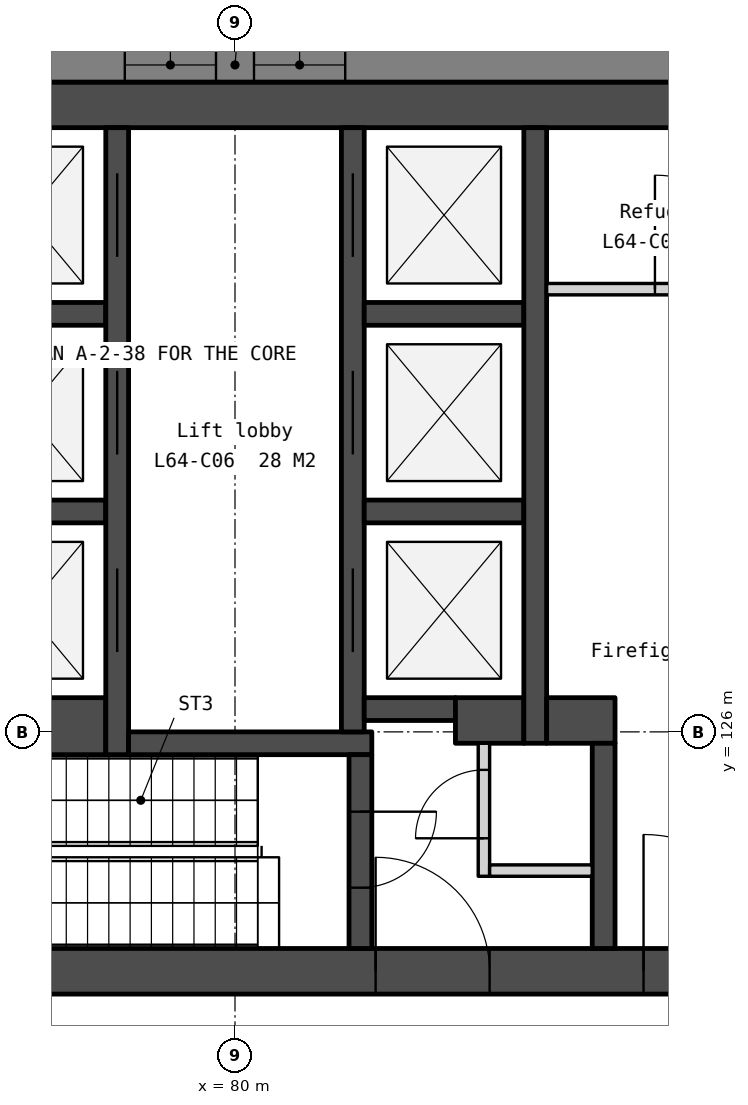
"""IFC4 building model, lengths in metres.
Left out: names, types, materials, properties, quantities, classifications, styles, units other than length and angle.
Written with IfcOpenShell. Run it as: python <this file> out.ifc"""

import sys

from ifc_helpers import new_model, si_unit, direction, frame, frame_2d, origin, place, context, subcontext, project, spatial, polyline, rectangle, outline, extrude, element, fill, save


model = new_model("IFC4")
c1 = context("Model", 3, precision=1e-05, world=origin(), true_north=direction((0.0, 1.0)))
c2 = subcontext(c1, "Body", "Model", "MODEL_VIEW")
j1 = project(units=[si_unit("LENGTHUNIT", "METRE"), si_unit("PLANEANGLEUNIT", "RADIAN")], contexts=[c1])
p1 = place(None, origin())
s1 = spatial("IfcSite", under=j1, at=p1, CompositionType="ELEMENT")
p2 = place(p1, origin())
s2 = spatial("IfcBuilding", under=s1, at=p2, CompositionType="ELEMENT")
p3 = place(p2, frame((0.0, 0.0, 262.1)))
s3 = spatial("IfcBuildingStorey", under=s2, at=p3, CompositionType="ELEMENT", Elevation=262.1)
p4 = place(p3, frame((69.0, 134.25, 0.0), z_axis=(0.0, 0.0, 1.0), x_axis=(1.0, 0.0, 0.0)))
e1 = element("IfcWall", 1, at=p4, inside=s3, PredefinedType="SOLIDWALL", context=c2, shape_type="SweptSolid", body=[
    extrude(rectangle(XDim=22.0, YDim=0.6, at=frame_2d((11.0, 0.0))), origin(), (0.0, 0.0, 1.0), 3.75),
])
p5 = place(p3, frame((69.0, 122.85, 0.0), z_axis=(0.0, 0.0, 1.0), x_axis=(1.0, 0.0, 0.0)))
e2 = element("IfcWall", 2, at=p5, inside=s3, PredefinedType="SOLIDWALL", context=c2, shape_type="SweptSolid", body=[
    extrude(rectangle(XDim=22.0, YDim=0.6, at=frame_2d((11.0, 0.0))), origin(), (0.0, 0.0, 1.0), 3.75),
])
p6 = place(p5, frame((16.375, 0.0, 0.0)))
e3 = element("IfcOpeningElement", 3, at=p6, cuts=e2, PredefinedType="OPENING", context=c2, shape_type="SweptSolid", body=[
    extrude(rectangle(XDim=1.8, YDim=2.1, at=frame_2d((0.9, 1.05))), frame((0.0, 0.31, 0.0), z_axis=(0.0, -1.0, 0.0), x_axis=(1.0, 0.0, 0.0)), (0.0, 0.0, 1.0), 0.62),
])
p7 = place(p5, frame((3.825, 0.0, 0.0)))
e4 = element("IfcOpeningElement", 4, at=p7, cuts=e2, PredefinedType="OPENING", context=c2, shape_type="SweptSolid", body=[
    extrude(rectangle(XDim=1.8, YDim=2.1, at=frame_2d((0.9, 1.05))), frame((0.0, 0.31, 0.0), z_axis=(0.0, -1.0, 0.0), x_axis=(1.0, 0.0, 0.0)), (0.0, 0.0, 1.0), 0.62),
])
p8 = place(p5, frame((12.85, 0.0, 0.0)))
e5 = element("IfcOpeningElement", 5, at=p8, cuts=e2, PredefinedType="OPENING", context=c2, shape_type="SweptSolid", body=[
    extrude(rectangle(XDim=1.5, YDim=2.1, at=frame_2d((0.75, 1.05))), frame((0.0, 0.31, 0.0), z_axis=(0.0, -1.0, 0.0), x_axis=(1.0, 0.0, 0.0)), (0.0, 0.0, 1.0), 0.62),
])
for number, where, z_axis, x_axis in (
    (6, (76.2, 131.5, 0.0), (0.0, 0.0, 1.0), (1.0, 0.0, 0.0)),
    (7, (76.2, 128.9, 0.0), (0.0, 0.0, 1.0), (1.0, 0.0, 0.0)),
):
    element("IfcWall", number, at=place(p3, frame(where, z_axis=z_axis, x_axis=x_axis)), inside=s3, PredefinedType="SOLIDWALL", context=c2, shape_type="SweptSolid", body=[
        extrude(rectangle(XDim=2.1, YDim=0.3, at=frame_2d((1.05, 0.0))), origin(), (0.0, 0.0, 1.0), 3.75),
    ])
p9 = place(p3, frame((76.2, 126.075, 0.0), z_axis=(0.0, 0.0, 1.0), x_axis=(1.0, 0.0, 0.0)))
e8 = element("IfcWall", 8, at=p9, inside=s3, PredefinedType="SOLIDWALL", context=c2, shape_type="SweptSolid", body=[
    extrude(rectangle(XDim=2.1, YDim=0.75, at=frame_2d((1.05, 0.0))), origin(), (0.0, 0.0, 1.0), 3.75),
])
p10 = place(p3, frame((78.45, 133.95, 0.0), z_axis=(0.0, 0.0, 1.0), x_axis=(0.0, -1.0, 0.0)))
e9 = element("IfcWall", 9, at=p10, inside=s3, PredefinedType="SOLIDWALL", context=c2, shape_type="SweptSolid", body=[
    extrude(rectangle(XDim=8.25, YDim=0.3, at=frame_2d((4.125, 0.0))), origin(), (0.0, 0.0, 1.0), 3.75),
])
p11 = place(p10, frame((0.6, 0.0, 0.0)))
e10 = element("IfcOpeningElement", 10, at=p11, cuts=e9, PredefinedType="OPENING", context=c2, shape_type="SweptSolid", body=[
    extrude(rectangle(XDim=1.1, YDim=2.1, at=frame_2d((0.55, 1.05))), frame((0.0, 0.16, 0.0), z_axis=(0.0, -1.0, 0.0), x_axis=(1.0, 0.0, 0.0)), (0.0, 0.0, 1.0), 0.32),
])
p12 = place(p10, frame((3.2, 0.0, 0.0)))
e11 = element("IfcOpeningElement", 11, at=p12, cuts=e9, PredefinedType="OPENING", context=c2, shape_type="SweptSolid", body=[
    extrude(rectangle(XDim=1.1, YDim=2.1, at=frame_2d((0.55, 1.05))), frame((0.0, 0.16, 0.0), z_axis=(0.0, -1.0, 0.0), x_axis=(1.0, 0.0, 0.0)), (0.0, 0.0, 1.0), 0.32),
])
p13 = place(p10, frame((5.8, 0.0, 0.0)))
e12 = element("IfcOpeningElement", 12, at=p13, cuts=e9, PredefinedType="OPENING", context=c2, shape_type="SweptSolid", body=[
    extrude(rectangle(XDim=1.1, YDim=2.1, at=frame_2d((0.55, 1.05))), frame((0.0, 0.16, 0.0), z_axis=(0.0, -1.0, 0.0), x_axis=(1.0, 0.0, 0.0)), (0.0, 0.0, 1.0), 0.32),
])
p14 = place(p3, frame((78.6, 125.85, 0.0), z_axis=(0.0, 0.0, 1.0), x_axis=(1.0, 0.0, 0.0)))
e13 = element("IfcWall", 13, at=p14, inside=s3, PredefinedType="SOLIDWALL", context=c2, shape_type="SweptSolid", body=[
    extrude(rectangle(XDim=3.2, YDim=0.3, at=frame_2d((1.6, 0.0))), origin(), (0.0, 0.0, 1.0), 3.75),
])
p15 = place(p3, frame((81.55, 133.95, 0.0), z_axis=(0.0, 0.0, 1.0), x_axis=(0.0, -1.0, 0.0)))
e14 = element("IfcWall", 14, at=p15, inside=s3, PredefinedType="SOLIDWALL", context=c2, shape_type="SweptSolid", body=[
    extrude(rectangle(XDim=7.95, YDim=0.3, at=frame_2d((3.975, 0.0))), origin(), (0.0, 0.0, 1.0), 3.75),
])
p16 = place(p15, frame((0.6, 0.0, 0.0)))
e15 = element("IfcOpeningElement", 15, at=p16, cuts=e14, PredefinedType="OPENING", context=c2, shape_type="SweptSolid", body=[
    extrude(rectangle(XDim=1.1, YDim=2.1, at=frame_2d((0.55, 1.05))), frame((0.0, 0.16, 0.0), z_axis=(0.0, -1.0, 0.0), x_axis=(1.0, 0.0, 0.0)), (0.0, 0.0, 1.0), 0.32),
])
p17 = place(p15, frame((3.2, 0.0, 0.0)))
e16 = element("IfcOpeningElement", 16, at=p17, cuts=e14, PredefinedType="OPENING", context=c2, shape_type="SweptSolid", body=[
    extrude(rectangle(XDim=1.1, YDim=2.1, at=frame_2d((0.55, 1.05))), frame((0.0, 0.16, 0.0), z_axis=(0.0, -1.0, 0.0), x_axis=(1.0, 0.0, 0.0)), (0.0, 0.0, 1.0), 0.32),
])
p18 = place(p15, frame((5.8, 0.0, 0.0)))
e17 = element("IfcOpeningElement", 17, at=p18, cuts=e14, PredefinedType="OPENING", context=c2, shape_type="SweptSolid", body=[
    extrude(rectangle(XDim=1.1, YDim=2.1, at=frame_2d((0.55, 1.05))), frame((0.0, 0.16, 0.0), z_axis=(0.0, -1.0, 0.0), x_axis=(1.0, 0.0, 0.0)), (0.0, 0.0, 1.0), 0.32),
])
p19 = place(p3, frame((81.65, 125.7, 0.0), z_axis=(0.0, 0.0, 1.0), x_axis=(0.0, -1.0, 0.0)))
e18 = element("IfcWall", 18, at=p19, inside=s3, PredefinedType="SOLIDWALL", context=c2, shape_type="SweptSolid", body=[
    extrude(rectangle(XDim=2.55, YDim=0.3, at=frame_2d((1.275, 0.0))), origin(), (0.0, 0.0, 1.0), 3.75),
])
p20 = place(p19, frame((0.75, 0.0, 0.0)))
e19 = element("IfcOpeningElement", 19, at=p20, cuts=e18, PredefinedType="OPENING", context=c2, shape_type="SweptSolid", body=[
    extrude(rectangle(XDim=1.0, YDim=2.1, at=frame_2d((0.5, 1.05))), frame((0.0, 0.16, 0.0), z_axis=(0.0, -1.0, 0.0), x_axis=(1.0, 0.0, 0.0)), (0.0, 0.0, 1.0), 0.32),
])
for number, where, z_axis, x_axis in (
    (20, (81.7, 131.5, 0.0), (0.0, 0.0, 1.0), (1.0, 0.0, 0.0)),
    (21, (81.7, 128.9, 0.0), (0.0, 0.0, 1.0), (1.0, 0.0, 0.0)),
):
    element("IfcWall", number, at=place(p3, frame(where, z_axis=z_axis, x_axis=x_axis)), inside=s3, PredefinedType="SOLIDWALL", context=c2, shape_type="SweptSolid", body=[
        extrude(rectangle(XDim=2.1, YDim=0.3, at=frame_2d((1.05, 0.0))), origin(), (0.0, 0.0, 1.0), 3.75),
    ])
p21 = place(p3, frame((81.7, 126.3, 0.0), z_axis=(0.0, 0.0, 1.0), x_axis=(1.0, 0.0, 0.0)))
e22 = element("IfcWall", 22, at=p21, inside=s3, PredefinedType="SOLIDWALL", context=c2, shape_type="SweptSolid", body=[
    extrude(rectangle(XDim=1.2, YDim=0.3, at=frame_2d((0.6, 0.0))), origin(), (0.0, 0.0, 1.0), 3.75),
])
p22 = place(p3, frame((82.9, 126.15, 0.0), z_axis=(0.0, 0.0, 1.0), x_axis=(1.0, 0.0, 0.0)))
e23 = element("IfcWall", 23, at=p22, inside=s3, PredefinedType="SOLIDWALL", context=c2, shape_type="SweptSolid", body=[
    extrude(rectangle(XDim=0.9, YDim=0.6, at=frame_2d((0.45, 0.0))), origin(), (0.0, 0.0, 1.0), 3.75),
])
p23 = place(p3, frame((83.275, 125.85, 0.0), z_axis=(0.0, 0.0, 1.0), x_axis=(0.0, -1.0, 0.0)))
e24 = element("IfcWall", 24, at=p23, inside=s3, PredefinedType="PARTITIONING", context=c2, shape_type="SweptSolid", body=[
    extrude(rectangle(XDim=1.75, YDim=0.15, at=frame_2d((0.875, 0.0))), origin(), (0.0, 0.0, 1.0), 3.75),
])
p24 = place(p23, frame((0.35, 0.0, 0.0)))
e25 = element("IfcOpeningElement", 25, at=p24, cuts=e24, PredefinedType="OPENING", context=c2, shape_type="SweptSolid", body=[
    extrude(rectangle(XDim=0.9, YDim=2.1, at=frame_2d((0.45, 1.05))), frame((0.0, 0.085, 0.0), z_axis=(0.0, -1.0, 0.0), x_axis=(1.0, 0.0, 0.0)), (0.0, 0.0, 1.0), 0.17),
])
p25 = place(p3, frame((83.35, 124.175, 0.0), z_axis=(0.0, 0.0, 1.0), x_axis=(1.0, 0.0, 0.0)))
e26 = element("IfcWall", 26, at=p25, inside=s3, PredefinedType="PARTITIONING", context=c2, shape_type="SweptSolid", body=[
    extrude(rectangle(XDim=1.35, YDim=0.15, at=frame_2d((0.675, 0.0))), origin(), (0.0, 0.0, 1.0), 3.75),
])
p26 = place(p3, frame((83.95, 133.95, 0.0), z_axis=(0.0, 0.0, 1.0), x_axis=(0.0, -1.0, 0.0)))
e27 = element("IfcWall", 27, at=p26, inside=s3, PredefinedType="SOLIDWALL", context=c2, shape_type="SweptSolid", body=[
    extrude(rectangle(XDim=8.1, YDim=0.3, at=frame_2d((4.05, 0.0))), origin(), (0.0, 0.0, 1.0), 3.75),
])
p27 = place(p3, frame((84.1, 131.825, 0.0), z_axis=(0.0, 0.0, 1.0), x_axis=(1.0, 0.0, 0.0)))
e28 = element("IfcWall", 28, at=p27, inside=s3, PredefinedType="PARTITIONING", context=c2, shape_type="SweptSolid", body=[
    extrude(rectangle(XDim=3.45, YDim=0.15, at=frame_2d((1.725, 0.0))), origin(), (0.0, 0.0, 1.0), 3.75),
])
p28 = place(p27, frame((1.425, 0.0, 0.0)))
e29 = element("IfcOpeningElement", 29, at=p28, cuts=e28, PredefinedType="OPENING", context=c2, shape_type="SweptSolid", body=[
    extrude(rectangle(XDim=1.5, YDim=2.1, at=frame_2d((0.75, 1.05))), frame((0.0, 0.085, 0.0), z_axis=(0.0, -1.0, 0.0), x_axis=(1.0, 0.0, 0.0)), (0.0, 0.0, 1.0), 0.17),
])
p29 = place(p3, frame((84.1, 126.15, 0.0), z_axis=(0.0, 0.0, 1.0), x_axis=(1.0, 0.0, 0.0)))
e30 = element("IfcWall", 30, at=p29, inside=s3, PredefinedType="SOLIDWALL", context=c2, shape_type="SweptSolid", body=[
    extrude(rectangle(XDim=0.9, YDim=0.6, at=frame_2d((0.45, 0.0))), origin(), (0.0, 0.0, 1.0), 3.75),
])
p30 = place(p3, frame((84.85, 125.85, 0.0), z_axis=(0.0, 0.0, 1.0), x_axis=(0.0, -1.0, 0.0)))
e31 = element("IfcWall", 31, at=p30, inside=s3, PredefinedType="SOLIDWALL", context=c2, shape_type="SweptSolid", body=[
    extrude(rectangle(XDim=2.7, YDim=0.3, at=frame_2d((1.35, 0.0))), origin(), (0.0, 0.0, 1.0), 3.75),
])
p31 = place(p3, frame((98.486, 134.775, -0.15), z_axis=(0.0, 0.0, 1.0), x_axis=(-1.0, 0.0, 0.0)))
e32 = element("IfcWall", 32, at=p31, inside=s3, PredefinedType="SOLIDWALL", context=c2, shape_type="SweptSolid", body=[
    extrude(outline(polyline([(36.972, 0.0), (36.972, 3.9), (0.0, 3.9), (0.0, 0.0), (36.972, 0.0)])), frame((0.0, 0.225, 0.0), z_axis=(0.0, -1.0, 0.0), x_axis=(1.0, 0.0, 0.0)), (0.0, 0.0, 1.0), 0.45),
])
p32 = place(p31, frame((0.744, 0.0, 0.95)))
e33 = element("IfcOpeningElement", 33, at=p32, cuts=e32, PredefinedType="OPENING", context=c2, shape_type="SweptSolid", body=[
    extrude(rectangle(XDim=1.2, YDim=2.2, at=frame_2d((0.6, 1.1))), frame((0.0, 0.235, 0.0), z_axis=(0.0, -1.0, 0.0), x_axis=(1.0, 0.0, 0.0)), (0.0, 0.0, 1.0), 0.47),
])
p33 = place(p31, frame((7.793, 0.0, 0.95)))
e34 = element("IfcOpeningElement", 34, at=p33, cuts=e32, PredefinedType="OPENING", context=c2, shape_type="SweptSolid", body=[
    extrude(rectangle(XDim=1.2, YDim=2.2, at=frame_2d((0.6, 1.1))), frame((0.0, 0.235, 0.0), z_axis=(0.0, -1.0, 0.0), x_axis=(1.0, 0.0, 0.0)), (0.0, 0.0, 1.0), 0.47),
])
p34 = place(p31, frame((9.493, 0.0, 0.95)))
e35 = element("IfcOpeningElement", 35, at=p34, cuts=e32, PredefinedType="OPENING", context=c2, shape_type="SweptSolid", body=[
    extrude(rectangle(XDim=1.2, YDim=2.2, at=frame_2d((0.6, 1.1))), frame((0.0, 0.235, 0.0), z_axis=(0.0, -1.0, 0.0), x_axis=(1.0, 0.0, 0.0)), (0.0, 0.0, 1.0), 0.47),
])
p35 = place(p31, frame((17.036, 0.0, 0.95)))
e36 = element("IfcOpeningElement", 36, at=p35, cuts=e32, PredefinedType="OPENING", context=c2, shape_type="SweptSolid", body=[
    extrude(rectangle(XDim=1.2, YDim=2.2, at=frame_2d((0.6, 1.1))), frame((0.0, 0.235, 0.0), z_axis=(0.0, -1.0, 0.0), x_axis=(1.0, 0.0, 0.0)), (0.0, 0.0, 1.0), 0.47),
])
p36 = place(p31, frame((18.736, 0.0, 0.95)))
e37 = element("IfcOpeningElement", 37, at=p36, cuts=e32, PredefinedType="OPENING", context=c2, shape_type="SweptSolid", body=[
    extrude(rectangle(XDim=1.2, YDim=2.2, at=frame_2d((0.6, 1.1))), frame((0.0, 0.235, 0.0), z_axis=(0.0, -1.0, 0.0), x_axis=(1.0, 0.0, 0.0)), (0.0, 0.0, 1.0), 0.47),
])
p37 = place(p31, frame((26.279, 0.0, 0.95)))
e38 = element("IfcOpeningElement", 38, at=p37, cuts=e32, PredefinedType="OPENING", context=c2, shape_type="SweptSolid", body=[
    extrude(rectangle(XDim=1.2, YDim=2.2, at=frame_2d((0.6, 1.1))), frame((0.0, 0.235, 0.0), z_axis=(0.0, -1.0, 0.0), x_axis=(1.0, 0.0, 0.0)), (0.0, 0.0, 1.0), 0.47),
])
p38 = place(p31, frame((27.979, 0.0, 0.95)))
e39 = element("IfcOpeningElement", 39, at=p38, cuts=e32, PredefinedType="OPENING", context=c2, shape_type="SweptSolid", body=[
    extrude(rectangle(XDim=1.2, YDim=2.2, at=frame_2d((0.6, 1.1))), frame((0.0, 0.235, 0.0), z_axis=(0.0, -1.0, 0.0), x_axis=(1.0, 0.0, 0.0)), (0.0, 0.0, 1.0), 0.47),
])
p39 = place(p31, frame((35.028, 0.0, 0.95)))
e40 = element("IfcOpeningElement", 40, at=p39, cuts=e32, PredefinedType="OPENING", context=c2, shape_type="SweptSolid", body=[
    extrude(rectangle(XDim=1.2, YDim=2.2, at=frame_2d((0.6, 1.1))), frame((0.0, 0.235, 0.0), z_axis=(0.0, -1.0, 0.0), x_axis=(1.0, 0.0, 0.0)), (0.0, 0.0, 1.0), 0.47),
])
p40 = place(p3, frame((80.905, 101.188, -0.15), z_axis=(0.0, 0.0, 1.0), x_axis=(0.500002536638, 0.866023939251, 0.0)))
e41 = element("IfcWall", 41, at=p40, inside=s3, PredefinedType="SOLIDWALL", context=c2, shape_type="SweptSolid", body=[
    extrude(outline(polyline([(36.972, 0.0), (36.972, 3.9), (0.0, 3.9), (0.0, 0.0), (36.972, 0.0)])), frame((0.0, 0.225, 0.0), z_axis=(0.0, -1.0, 0.0), x_axis=(1.0, 0.0, 0.0)), (0.0, 0.0, 1.0), 0.45),
])
p41 = place(p40, frame((0.744, 0.0, 0.95)))
e42 = element("IfcOpeningElement", 42, at=p41, cuts=e41, PredefinedType="OPENING", context=c2, shape_type="SweptSolid", body=[
    extrude(rectangle(XDim=1.2, YDim=2.2, at=frame_2d((0.6, 1.1))), frame((0.0, 0.235, 0.0), z_axis=(0.0, -1.0, 0.0), x_axis=(1.0, 0.0, 0.0)), (0.0, 0.0, 1.0), 0.47),
])
p42 = place(p40, frame((7.793, 0.0, 0.95)))
e43 = element("IfcOpeningElement", 43, at=p42, cuts=e41, PredefinedType="OPENING", context=c2, shape_type="SweptSolid", body=[
    extrude(rectangle(XDim=1.2, YDim=2.2, at=frame_2d((0.6, 1.1))), frame((0.0, 0.235, 0.0), z_axis=(0.0, -1.0, 0.0), x_axis=(1.0, 0.0, 0.0)), (0.0, 0.0, 1.0), 0.47),
])
p43 = place(p40, frame((9.493, 0.0, 0.95)))
e44 = element("IfcOpeningElement", 44, at=p43, cuts=e41, PredefinedType="OPENING", context=c2, shape_type="SweptSolid", body=[
    extrude(rectangle(XDim=1.2, YDim=2.2, at=frame_2d((0.6, 1.1))), frame((0.0, 0.235, 0.0), z_axis=(0.0, -1.0, 0.0), x_axis=(1.0, 0.0, 0.0)), (0.0, 0.0, 1.0), 0.47),
])
p44 = place(p40, frame((17.036, 0.0, 0.95)))
e45 = element("IfcOpeningElement", 45, at=p44, cuts=e41, PredefinedType="OPENING", context=c2, shape_type="SweptSolid", body=[
    extrude(rectangle(XDim=1.2, YDim=2.2, at=frame_2d((0.6, 1.1))), frame((0.0, 0.235, 0.0), z_axis=(0.0, -1.0, 0.0), x_axis=(1.0, 0.0, 0.0)), (0.0, 0.0, 1.0), 0.47),
])
p45 = place(p40, frame((18.736, 0.0, 0.95)))
e46 = element("IfcOpeningElement", 46, at=p45, cuts=e41, PredefinedType="OPENING", context=c2, shape_type="SweptSolid", body=[
    extrude(rectangle(XDim=1.2, YDim=2.2, at=frame_2d((0.6, 1.1))), frame((0.0, 0.235, 0.0), z_axis=(0.0, -1.0, 0.0), x_axis=(1.0, 0.0, 0.0)), (0.0, 0.0, 1.0), 0.47),
])
p46 = place(p40, frame((26.279, 0.0, 0.95)))
e47 = element("IfcOpeningElement", 47, at=p46, cuts=e41, PredefinedType="OPENING", context=c2, shape_type="SweptSolid", body=[
    extrude(rectangle(XDim=1.2, YDim=2.2, at=frame_2d((0.6, 1.1))), frame((0.0, 0.235, 0.0), z_axis=(0.0, -1.0, 0.0), x_axis=(1.0, 0.0, 0.0)), (0.0, 0.0, 1.0), 0.47),
])
p47 = place(p40, frame((27.979, 0.0, 0.95)))
e48 = element("IfcOpeningElement", 48, at=p47, cuts=e41, PredefinedType="OPENING", context=c2, shape_type="SweptSolid", body=[
    extrude(rectangle(XDim=1.2, YDim=2.2, at=frame_2d((0.6, 1.1))), frame((0.0, 0.235, 0.0), z_axis=(0.0, -1.0, 0.0), x_axis=(1.0, 0.0, 0.0)), (0.0, 0.0, 1.0), 0.47),
])
p48 = place(p40, frame((35.028, 0.0, 0.95)))
e49 = element("IfcOpeningElement", 49, at=p48, cuts=e41, PredefinedType="OPENING", context=c2, shape_type="SweptSolid", body=[
    extrude(rectangle(XDim=1.2, YDim=2.2, at=frame_2d((0.6, 1.1))), frame((0.0, 0.235, 0.0), z_axis=(0.0, -1.0, 0.0), x_axis=(1.0, 0.0, 0.0)), (0.0, 0.0, 1.0), 0.47),
])
p49 = place(p11, origin())
e50 = element("IfcDoor", 50, at=p49, inside=s3, OperationType="SLIDING_TO_RIGHT", PredefinedType="DOOR", context=c2, shape_type="SweptSolid", body=[
    extrude(rectangle(XDim=1.1, YDim=2.1, at=frame_2d((0.55, 1.05))), frame((0.0, 0.025, 0.0), z_axis=(0.0, -1.0, 0.0), x_axis=(1.0, 0.0, 0.0)), (0.0, 0.0, 1.0), 0.05),
])
fill(e10, e50)
p50 = place(p12, origin())
e51 = element("IfcDoor", 51, at=p50, inside=s3, OperationType="SLIDING_TO_RIGHT", PredefinedType="DOOR", context=c2, shape_type="SweptSolid", body=[
    extrude(rectangle(XDim=1.1, YDim=2.1, at=frame_2d((0.55, 1.05))), frame((0.0, 0.025, 0.0), z_axis=(0.0, -1.0, 0.0), x_axis=(1.0, 0.0, 0.0)), (0.0, 0.0, 1.0), 0.05),
])
fill(e11, e51)
p51 = place(p13, origin())
e52 = element("IfcDoor", 52, at=p51, inside=s3, OperationType="SLIDING_TO_RIGHT", PredefinedType="DOOR", context=c2, shape_type="SweptSolid", body=[
    extrude(rectangle(XDim=1.1, YDim=2.1, at=frame_2d((0.55, 1.05))), frame((0.0, 0.025, 0.0), z_axis=(0.0, -1.0, 0.0), x_axis=(1.0, 0.0, 0.0)), (0.0, 0.0, 1.0), 0.05),
])
fill(e12, e52)
p52 = place(p16, origin())
e53 = element("IfcDoor", 53, at=p52, inside=s3, OperationType="SLIDING_TO_LEFT", PredefinedType="DOOR", context=c2, shape_type="SweptSolid", body=[
    extrude(rectangle(XDim=1.1, YDim=2.1, at=frame_2d((0.55, 1.05))), frame((0.0, 0.025, 0.0), z_axis=(0.0, -1.0, 0.0), x_axis=(1.0, 0.0, 0.0)), (0.0, 0.0, 1.0), 0.05),
])
fill(e15, e53)
p53 = place(p17, origin())
e54 = element("IfcDoor", 54, at=p53, inside=s3, OperationType="SLIDING_TO_LEFT", PredefinedType="DOOR", context=c2, shape_type="SweptSolid", body=[
    extrude(rectangle(XDim=1.1, YDim=2.1, at=frame_2d((0.55, 1.05))), frame((0.0, 0.025, 0.0), z_axis=(0.0, -1.0, 0.0), x_axis=(1.0, 0.0, 0.0)), (0.0, 0.0, 1.0), 0.05),
])
fill(e16, e54)
p54 = place(p18, origin())
e55 = element("IfcDoor", 55, at=p54, inside=s3, OperationType="SLIDING_TO_LEFT", PredefinedType="DOOR", context=c2, shape_type="SweptSolid", body=[
    extrude(rectangle(XDim=1.1, YDim=2.1, at=frame_2d((0.55, 1.05))), frame((0.0, 0.025, 0.0), z_axis=(0.0, -1.0, 0.0), x_axis=(1.0, 0.0, 0.0)), (0.0, 0.0, 1.0), 0.05),
])
fill(e17, e55)
p55 = place(p6, origin())
e56 = element("IfcDoor", 56, at=p55, inside=s3, OperationType="DOUBLE_DOOR_DOUBLE_SWING", PredefinedType="DOOR", context=c2, shape_type="SweptSolid", body=[
    extrude(rectangle(XDim=1.8, YDim=2.1, at=frame_2d((0.9, 1.05))), frame((0.0, 0.025, 0.0), z_axis=(0.0, -1.0, 0.0), x_axis=(1.0, 0.0, 0.0)), (0.0, 0.0, 1.0), 0.05),
])
fill(e3, e56)
p56 = place(p8, origin())
e57 = element("IfcDoor", 57, at=p56, inside=s3, OperationType="DOUBLE_DOOR_DOUBLE_SWING", PredefinedType="DOOR", context=c2, shape_type="SweptSolid", body=[
    extrude(rectangle(XDim=1.5, YDim=2.1, at=frame_2d((0.75, 1.05))), frame((0.0, 0.025, 0.0), z_axis=(0.0, -1.0, 0.0), x_axis=(1.0, 0.0, 0.0)), (0.0, 0.0, 1.0), 0.05),
])
fill(e5, e57)
p57 = place(p24, origin())
e58 = element("IfcDoor", 58, at=p57, inside=s3, OperationType="SINGLE_SWING_RIGHT", PredefinedType="DOOR", context=c2, shape_type="SweptSolid", body=[
    extrude(rectangle(XDim=0.9, YDim=2.1, at=frame_2d((0.45, 1.05))), frame((0.0, 0.025, 0.0), z_axis=(0.0, -1.0, 0.0), x_axis=(1.0, 0.0, 0.0)), (0.0, 0.0, 1.0), 0.05),
])
fill(e25, e58)
p58 = place(p28, origin())
e59 = element("IfcDoor", 59, at=p58, inside=s3, OperationType="DOUBLE_DOOR_DOUBLE_SWING", PredefinedType="DOOR", context=c2, shape_type="SweptSolid", body=[
    extrude(rectangle(XDim=1.5, YDim=2.1, at=frame_2d((0.75, 1.05))), frame((0.0, 0.025, 0.0), z_axis=(0.0, -1.0, 0.0), x_axis=(1.0, 0.0, 0.0)), (0.0, 0.0, 1.0), 0.05),
])
fill(e29, e59)
p59 = place(p20, origin())
e60 = element("IfcDoor", 60, at=p59, inside=s3, OperationType="SINGLE_SWING_LEFT", PredefinedType="DOOR", context=c2, shape_type="SweptSolid", body=[
    extrude(rectangle(XDim=1.0, YDim=2.1, at=frame_2d((0.5, 1.05))), frame((0.0, 0.025, 0.0), z_axis=(0.0, -1.0, 0.0), x_axis=(1.0, 0.0, 0.0)), (0.0, 0.0, 1.0), 0.05),
])
fill(e19, e60)
p60 = place(p35, origin())
e61 = element("IfcWindow", 61, at=p60, inside=s3, PartitioningType="SINGLE_PANEL", PredefinedType="WINDOW", context=c2, shape_type="SweptSolid", body=[
    extrude(rectangle(XDim=1.2, YDim=2.2, at=frame_2d((0.6, 1.1))), frame((0.0, 0.03, 0.0), z_axis=(0.0, -1.0, 0.0), x_axis=(1.0, 0.0, 0.0)), (0.0, 0.0, 1.0), 0.06),
])
fill(e36, e61)
p61 = place(p36, origin())
e62 = element("IfcWindow", 62, at=p61, inside=s3, PartitioningType="SINGLE_PANEL", PredefinedType="WINDOW", context=c2, shape_type="SweptSolid", body=[
    extrude(rectangle(XDim=1.2, YDim=2.2, at=frame_2d((0.6, 1.1))), frame((0.0, 0.03, 0.0), z_axis=(0.0, -1.0, 0.0), x_axis=(1.0, 0.0, 0.0)), (0.0, 0.0, 1.0), 0.06),
])
fill(e37, e62)
save(model, sys.argv[1])
